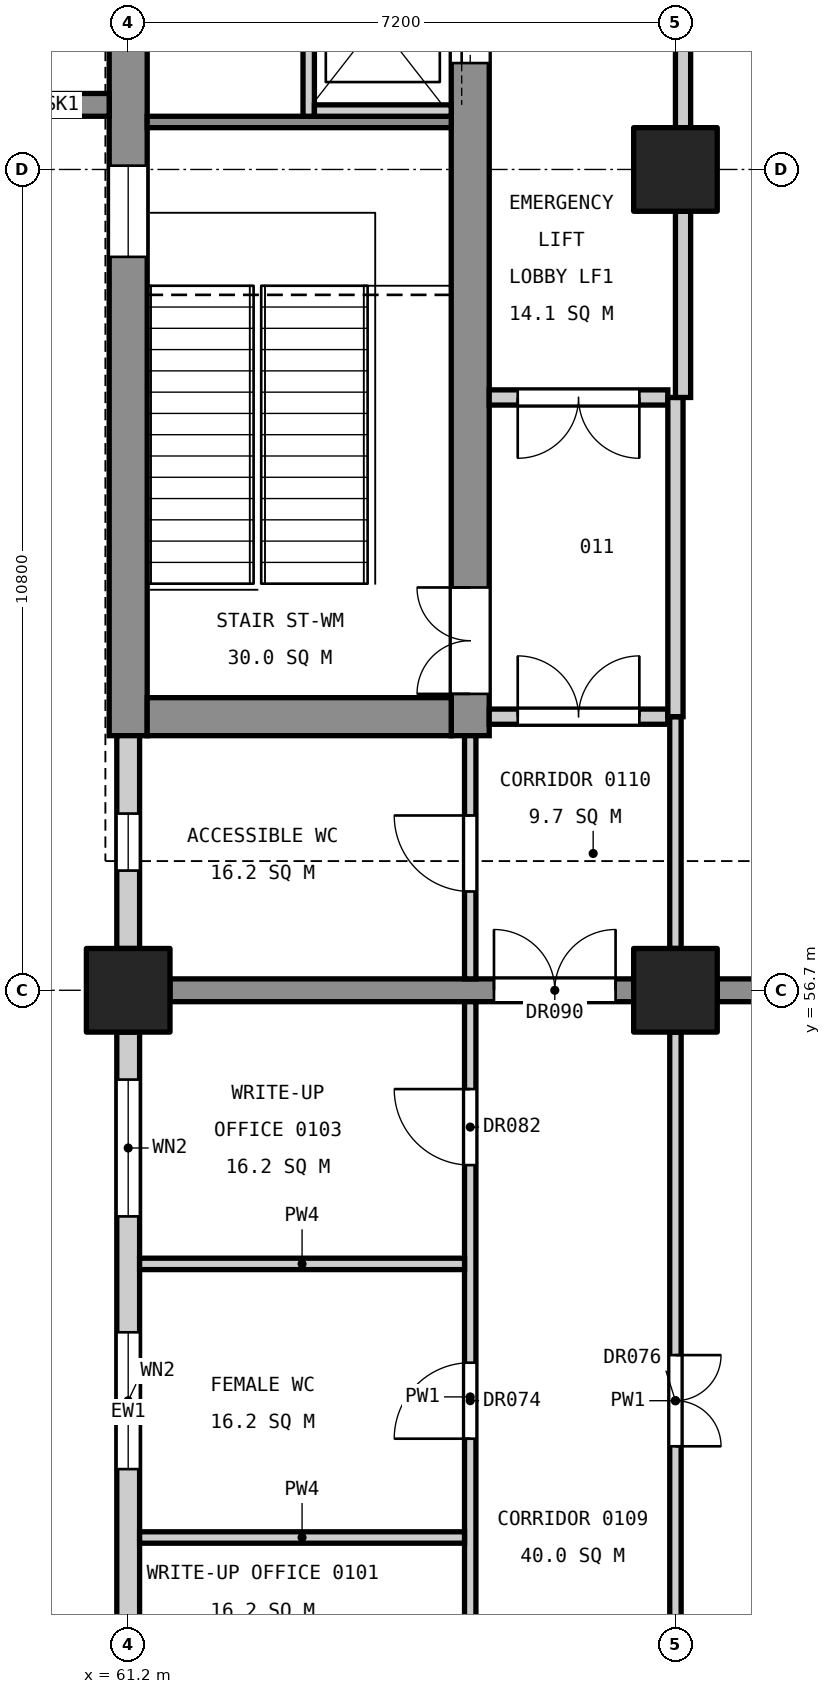
"""IFC4 building model, lengths in metres.
Left out: names, types, materials, properties, quantities, classifications, styles, units other than length and angle.
Written with IfcOpenShell. Run it as: python <this file> out.ifc"""

import sys

from ifc_helpers import new_model, si_unit, direction, frame, frame_2d, origin, origin_2d, place, context, subcontext, project, spatial, rectangle, extrude, element, fill, save


model = new_model("IFC4")
c1 = context("Model", 3, precision=1e-05, world=origin(), true_north=direction((0.0, 1.0)))
c2 = subcontext(c1, "Body", "Model", "MODEL_VIEW")
j1 = project(units=[si_unit("LENGTHUNIT", "METRE"), si_unit("PLANEANGLEUNIT", "RADIAN")], contexts=[c1])
p1 = place(None, origin())
s1 = spatial("IfcSite", under=j1, at=p1, CompositionType="ELEMENT")
p2 = place(p1, origin())
s2 = spatial("IfcBuilding", under=s1, at=p2, CompositionType="ELEMENT")
p3 = place(p2, frame((0.0, 0.0, 6.0)))
s3 = spatial("IfcBuildingStorey", under=s2, at=p3, CompositionType="ELEMENT", Elevation=6.0)
for number, where, z_axis, x_axis in (
    (1, (61.2, 56.7, 0.0), (0.0, 0.0, 1.0), (1.0, 0.0, 0.0)),
    (2, (68.4, 56.7, 0.0), (0.0, 0.0, 1.0), (1.0, 0.0, 0.0)),
    (3, (68.4, 67.5, 0.0), (0.0, 0.0, 1.0), (1.0, 0.0, 0.0)),
):
    element("IfcColumn", number, at=place(p3, frame(where, z_axis=z_axis, x_axis=x_axis)), inside=s3, PredefinedType="COLUMN", context=c2, shape_type="SweptSolid", body=[
        extrude(rectangle(XDim=1.1, YDim=1.1, at=origin_2d()), origin(), (0.0, 0.0, 1.0), 5.4),
    ])
p4 = place(p3, frame((61.2, 60.05, 0.0), z_axis=(0.0, 0.0, 1.0), x_axis=(0.0, 1.0, 0.0)))
e4 = element("IfcWall", 4, at=p4, inside=s3, PredefinedType="SHEAR", context=c2, shape_type="SweptSolid", body=[
    extrude(rectangle(XDim=14.9, YDim=0.5, at=frame_2d((7.45, 0.0))), origin(), (0.0, 0.0, 1.0), 5.1),
])
p5 = place(p4, frame((6.3, 0.0, 3.4)))
e5 = element("IfcOpeningElement", 5, at=p5, cuts=e4, PredefinedType="OPENING", context=c2, shape_type="SweptSolid", body=[
    extrude(rectangle(XDim=1.2, YDim=0.9, at=frame_2d((0.6, 0.45))), frame((0.0, 0.26, 0.0), z_axis=(0.0, -1.0, 0.0), x_axis=(1.0, 0.0, 0.0)), (0.0, 0.0, 1.0), 0.52),
])
p6 = place(p3, frame((65.7, 60.05, 0.0), z_axis=(0.0, 0.0, 1.0), x_axis=(0.0, 1.0, 0.0)))
e6 = element("IfcWall", 6, at=p6, inside=s3, PredefinedType="SHEAR", context=c2, shape_type="SweptSolid", body=[
    extrude(rectangle(XDim=14.9, YDim=0.5, at=frame_2d((7.45, 0.0))), origin(), (0.0, 0.0, 1.0), 5.1),
])
p7 = place(p6, frame((0.55, 0.0, 0.0)))
e7 = element("IfcOpeningElement", 7, at=p7, cuts=e6, PredefinedType="OPENING", context=c2, shape_type="SweptSolid", body=[
    extrude(rectangle(XDim=1.4, YDim=2.1, at=frame_2d((0.7, 1.05))), frame((0.0, 0.26, 0.0), z_axis=(0.0, -1.0, 0.0), x_axis=(1.0, 0.0, 0.0)), (0.0, 0.0, 1.0), 0.52),
])
p8 = place(p6, frame((8.85, 0.0, 0.0)))
e8 = element("IfcOpeningElement", 8, at=p8, cuts=e6, PredefinedType="OPENING", context=c2, shape_type="SweptSolid", body=[
    extrude(rectangle(XDim=1.1, YDim=2.1, at=frame_2d((0.55, 1.05))), frame((0.0, 0.26, 0.0), z_axis=(0.0, -1.0, 0.0), x_axis=(1.0, 0.0, 0.0)), (0.0, 0.0, 1.0), 0.52),
])
p9 = place(p6, frame((11.4, 0.0, 0.0)))
e9 = element("IfcOpeningElement", 9, at=p9, cuts=e6, PredefinedType="OPENING", context=c2, shape_type="SweptSolid", body=[
    extrude(rectangle(XDim=1.1, YDim=2.1, at=frame_2d((0.55, 1.05))), frame((0.0, 0.26, 0.0), z_axis=(0.0, -1.0, 0.0), x_axis=(1.0, 0.0, 0.0)), (0.0, 0.0, 1.0), 0.52),
])
p10 = place(p3, frame((61.45, 60.3, 0.0), z_axis=(0.0, 0.0, 1.0), x_axis=(1.0, 0.0, 0.0)))
e10 = element("IfcWall", 10, at=p10, inside=s3, PredefinedType="SHEAR", context=c2, shape_type="SweptSolid", body=[
    extrude(rectangle(XDim=4.0, YDim=0.5, at=frame_2d((2.0, 0.0))), origin(), (0.0, 0.0, 1.0), 5.1),
])
p11 = place(p3, frame((60.95, 68.35, 0.0), z_axis=(0.0, 0.0, 1.0), x_axis=(-1.0, 0.0, 0.0)))
e11 = element("IfcWall", 11, at=p11, inside=s3, PredefinedType="SHEAR", context=c2, shape_type="SweptSolid", body=[
    extrude(rectangle(XDim=1.25, YDim=0.3, at=frame_2d((0.625, 0.0))), origin(), (0.0, 0.0, 1.0), 5.4),
])
p12 = place(p3, frame((61.75, 56.7, 0.0), z_axis=(0.0, 0.0, 1.0), x_axis=(1.0, 0.0, 0.0)))
e12 = element("IfcWall", 12, at=p12, inside=s3, PredefinedType="SHEAR", context=c2, shape_type="SweptSolid", body=[
    extrude(rectangle(XDim=6.1, YDim=0.3, at=frame_2d((3.05, 0.0))), origin(), (0.0, 0.0, 1.0), 5.1),
])
p13 = place(p12, frame((4.262, 0.0, 0.0)))
e13 = element("IfcOpeningElement", 13, at=p13, cuts=e12, PredefinedType="OPENING", context=c2, shape_type="SweptSolid", body=[
    extrude(rectangle(XDim=1.6, YDim=2.1, at=frame_2d((0.8, 1.05))), frame((0.0, 0.16, 0.0), z_axis=(0.0, -1.0, 0.0), x_axis=(1.0, 0.0, 0.0)), (0.0, 0.0, 1.0), 0.32),
])
p14 = place(p3, frame((68.95, 56.7, 0.0), z_axis=(0.0, 0.0, 1.0), x_axis=(1.0, 0.0, 0.0)))
e14 = element("IfcWall", 14, at=p14, inside=s3, PredefinedType="SHEAR", context=c2, shape_type="SweptSolid", body=[
    extrude(rectangle(XDim=9.7, YDim=0.3, at=frame_2d((4.85, 0.0))), origin(), (0.0, 0.0, 1.0), 5.1),
])
p15 = place(p3, frame((61.45, 68.125, 0.0), z_axis=(0.0, 0.0, 1.0), x_axis=(1.0, 0.0, 0.0)))
e15 = element("IfcWall", 15, at=p15, inside=s3, PredefinedType="SOLIDWALL", context=c2, shape_type="SweptSolid", body=[
    extrude(rectangle(XDim=4.0, YDim=0.15, at=frame_2d((2.0, 0.0))), origin(), (0.0, 0.0, 1.0), 5.1),
])
p16 = place(p3, frame((63.575, 68.2, 0.0), z_axis=(0.0, 0.0, 1.0), x_axis=(0.0, 1.0, 0.0)))
e16 = element("IfcWall", 16, at=p16, inside=s3, PredefinedType="SOLIDWALL", context=c2, shape_type="SweptSolid", body=[
    extrude(rectangle(XDim=2.5, YDim=0.15, at=frame_2d((1.25, 0.0))), origin(), (0.0, 0.0, 1.0), 5.4),
])
p17 = place(p3, frame((63.65, 68.275, 0.0), z_axis=(0.0, 0.0, 1.0), x_axis=(1.0, 0.0, 0.0)))
e17 = element("IfcWall", 17, at=p17, inside=s3, PredefinedType="SOLIDWALL", context=c2, shape_type="SweptSolid", body=[
    extrude(rectangle(XDim=1.8, YDim=0.15, at=frame_2d((0.9, 0.0))), origin(), (0.0, 0.0, 1.0), 5.4),
])
p18 = place(p3, frame((61.2, 46.15, 0.0), z_axis=(0.0, 0.0, 1.0), x_axis=(0.0, 1.0, 0.0)))
e18 = element("IfcWall", 18, at=p18, inside=s3, PredefinedType="STANDARD", context=c2, shape_type="SweptSolid", body=[
    extrude(rectangle(XDim=10.0, YDim=0.3, at=frame_2d((5.0, 0.0))), origin(), (0.0, 0.0, 1.0), 4.1),
])
p19 = place(p18, frame((1.3, 0.0, 0.8)))
e19 = element("IfcOpeningElement", 19, at=p19, cuts=e18, PredefinedType="OPENING", context=c2, shape_type="SweptSolid", body=[
    extrude(rectangle(XDim=0.75, YDim=1.2, at=frame_2d((0.375, 0.6))), frame((0.0, 0.16, 0.0), z_axis=(0.0, -1.0, 0.0), x_axis=(1.0, 0.0, 0.0)), (0.0, 0.0, 1.0), 0.32),
])
p20 = place(p18, frame((4.25, 0.0, 0.9)))
e20 = element("IfcOpeningElement", 20, at=p20, cuts=e18, PredefinedType="OPENING", context=c2, shape_type="SweptSolid", body=[
    extrude(rectangle(XDim=1.8, YDim=3.0, at=frame_2d((0.9, 1.5))), frame((0.0, 0.16, 0.0), z_axis=(0.0, -1.0, 0.0), x_axis=(1.0, 0.0, 0.0)), (0.0, 0.0, 1.0), 0.32),
])
p21 = place(p18, frame((7.575, 0.0, 0.9)))
e21 = element("IfcOpeningElement", 21, at=p21, cuts=e18, PredefinedType="OPENING", context=c2, shape_type="SweptSolid", body=[
    extrude(rectangle(XDim=1.8, YDim=3.0, at=frame_2d((0.9, 1.5))), frame((0.0, 0.16, 0.0), z_axis=(0.0, -1.0, 0.0), x_axis=(1.0, 0.0, 0.0)), (0.0, 0.0, 1.0), 0.32),
])
p22 = place(p3, frame((61.2, 57.25, 0.0), z_axis=(0.0, 0.0, 1.0), x_axis=(0.0, 1.0, 0.0)))
e22 = element("IfcWall", 22, at=p22, inside=s3, PredefinedType="STANDARD", context=c2, shape_type="SweptSolid", body=[
    extrude(rectangle(XDim=2.8, YDim=0.3, at=frame_2d((1.4, 0.0))), origin(), (0.0, 0.0, 1.0), 4.1),
])
p23 = place(p22, frame((1.025, 0.0, 0.8)))
e23 = element("IfcOpeningElement", 23, at=p23, cuts=e22, PredefinedType="OPENING", context=c2, shape_type="SweptSolid", body=[
    extrude(rectangle(XDim=0.75, YDim=1.2, at=frame_2d((0.375, 0.6))), frame((0.0, 0.16, 0.0), z_axis=(0.0, -1.0, 0.0), x_axis=(1.0, 0.0, 0.0)), (0.0, 0.0, 1.0), 0.32),
])
p24 = place(p3, frame((65.7, 46.15, 0.0), z_axis=(0.0, 0.0, 1.0), x_axis=(0.0, 1.0, 0.0)))
e24 = element("IfcWall", 24, at=p24, inside=s3, PredefinedType="PARTITIONING", context=c2, shape_type="SweptSolid", body=[
    extrude(rectangle(XDim=10.4, YDim=0.15, at=frame_2d((5.2, 0.0))), origin(), (0.0, 0.0, 1.0), 4.0),
])
p25 = place(p24, frame((4.65, 0.0, 0.0)))
e25 = element("IfcOpeningElement", 25, at=p25, cuts=e24, PredefinedType="OPENING", context=c2, shape_type="SweptSolid", body=[
    extrude(rectangle(XDim=1.0, YDim=2.1, at=frame_2d((0.5, 1.05))), frame((0.0, 0.085, 0.0), z_axis=(0.0, -1.0, 0.0), x_axis=(1.0, 0.0, 0.0)), (0.0, 0.0, 1.0), 0.17),
])
p26 = place(p24, frame((1.05, 0.0, 0.0)))
e26 = element("IfcOpeningElement", 26, at=p26, cuts=e24, PredefinedType="OPENING", context=c2, shape_type="SweptSolid", body=[
    extrude(rectangle(XDim=1.0, YDim=2.1, at=frame_2d((0.5, 1.05))), frame((0.0, 0.085, 0.0), z_axis=(0.0, -1.0, 0.0), x_axis=(1.0, 0.0, 0.0)), (0.0, 0.0, 1.0), 0.17),
])
p27 = place(p24, frame((8.25, 0.0, 0.0)))
e27 = element("IfcOpeningElement", 27, at=p27, cuts=e24, PredefinedType="OPENING", context=c2, shape_type="SweptSolid", body=[
    extrude(rectangle(XDim=1.0, YDim=2.1, at=frame_2d((0.5, 1.05))), frame((0.0, 0.085, 0.0), z_axis=(0.0, -1.0, 0.0), x_axis=(1.0, 0.0, 0.0)), (0.0, 0.0, 1.0), 0.17),
])
p28 = place(p3, frame((65.7, 56.85, 0.0), z_axis=(0.0, 0.0, 1.0), x_axis=(0.0, 1.0, 0.0)))
e28 = element("IfcWall", 28, at=p28, inside=s3, PredefinedType="PARTITIONING", context=c2, shape_type="SweptSolid", body=[
    extrude(rectangle(XDim=3.2, YDim=0.15, at=frame_2d((1.6, 0.0))), origin(), (0.0, 0.0, 1.0), 4.0),
])
p29 = place(p28, frame((1.15, 0.0, 0.0)))
e29 = element("IfcOpeningElement", 29, at=p29, cuts=e28, PredefinedType="OPENING", context=c2, shape_type="SweptSolid", body=[
    extrude(rectangle(XDim=1.0, YDim=2.1, at=frame_2d((0.5, 1.05))), frame((0.0, 0.085, 0.0), z_axis=(0.0, -1.0, 0.0), x_axis=(1.0, 0.0, 0.0)), (0.0, 0.0, 1.0), 0.17),
])
for number, where, z_axis, x_axis in (
    (30, (61.35, 49.5, 0.0), (0.0, 0.0, 1.0), (1.0, 0.0, 0.0)),
    (31, (61.35, 53.1, 0.0), (0.0, 0.0, 1.0), (1.0, 0.0, 0.0)),
):
    element("IfcWall", number, at=place(p3, frame(where, z_axis=z_axis, x_axis=x_axis)), inside=s3, PredefinedType="PARTITIONING", context=c2, shape_type="SweptSolid", body=[
        extrude(rectangle(XDim=4.275, YDim=0.15, at=frame_2d((2.137, 0.0))), origin(), (0.0, 0.0, 1.0), 4.3),
    ])
p30 = place(p3, frame((65.95, 60.3, 0.0), z_axis=(0.0, 0.0, 1.0), x_axis=(1.0, 0.0, 0.0)))
e32 = element("IfcWall", 32, at=p30, inside=s3, PredefinedType="PARTITIONING", context=c2, shape_type="SweptSolid", body=[
    extrude(rectangle(XDim=2.35, YDim=0.2, at=frame_2d((1.175, 0.0))), origin(), (0.0, 0.0, 1.0), 4.3),
])
p31 = place(p30, frame((0.375, 0.0, 0.0)))
e33 = element("IfcOpeningElement", 33, at=p31, cuts=e32, PredefinedType="OPENING", context=c2, shape_type="SweptSolid", body=[
    extrude(rectangle(XDim=1.6, YDim=2.1, at=frame_2d((0.8, 1.05))), frame((0.0, 0.11, 0.0), z_axis=(0.0, -1.0, 0.0), x_axis=(1.0, 0.0, 0.0)), (0.0, 0.0, 1.0), 0.22),
])
p32 = place(p3, frame((65.95, 64.5, 0.0), z_axis=(0.0, 0.0, 1.0), x_axis=(1.0, 0.0, 0.0)))
e34 = element("IfcWall", 34, at=p32, inside=s3, PredefinedType="PARTITIONING", context=c2, shape_type="SweptSolid", body=[
    extrude(rectangle(XDim=2.35, YDim=0.2, at=frame_2d((1.175, 0.0))), origin(), (0.0, 0.0, 1.0), 4.0),
])
p33 = place(p32, frame((0.375, 0.0, 0.0)))
e35 = element("IfcOpeningElement", 35, at=p33, cuts=e34, PredefinedType="OPENING", context=c2, shape_type="SweptSolid", body=[
    extrude(rectangle(XDim=1.6, YDim=2.1, at=frame_2d((0.8, 1.05))), frame((0.0, 0.11, 0.0), z_axis=(0.0, -1.0, 0.0), x_axis=(1.0, 0.0, 0.0)), (0.0, 0.0, 1.0), 0.22),
])
p34 = place(p3, frame((68.4, 46.45, 0.0), z_axis=(0.0, 0.0, 1.0), x_axis=(0.0, 1.0, 0.0)))
e36 = element("IfcWall", 36, at=p34, inside=s3, PredefinedType="PARTITIONING", context=c2, shape_type="SweptSolid", body=[
    extrude(rectangle(XDim=9.7, YDim=0.15, at=frame_2d((4.85, 0.0))), origin(), (0.0, 0.0, 1.0), 4.0),
])
p35 = place(p34, frame((4.25, 0.0, 0.0)))
e37 = element("IfcOpeningElement", 37, at=p35, cuts=e36, PredefinedType="OPENING", context=c2, shape_type="SweptSolid", body=[
    extrude(rectangle(XDim=1.2, YDim=2.1, at=frame_2d((0.6, 1.05))), frame((0.0, 0.085, 0.0), z_axis=(0.0, -1.0, 0.0), x_axis=(1.0, 0.0, 0.0)), (0.0, 0.0, 1.0), 0.17),
])
p36 = place(p3, frame((68.4, 57.25, 0.0), z_axis=(0.0, 0.0, 1.0), x_axis=(0.0, 1.0, 0.0)))
e38 = element("IfcWall", 38, at=p36, inside=s3, PredefinedType="PARTITIONING", context=c2, shape_type="SweptSolid", body=[
    extrude(rectangle(XDim=3.05, YDim=0.15, at=frame_2d((1.525, 0.0))), origin(), (0.0, 0.0, 1.0), 4.0),
])
p37 = place(p3, frame((68.4, 60.3, 0.0), z_axis=(0.0, 0.0, 1.0), x_axis=(0.0, 1.0, 0.0)))
e39 = element("IfcWall", 39, at=p37, inside=s3, PredefinedType="PARTITIONING", context=c2, shape_type="SweptSolid", body=[
    extrude(rectangle(XDim=4.2, YDim=0.2, at=frame_2d((2.1, 0.0))), origin(), (0.0, 0.0, 1.0), 4.0),
])
p38 = place(p3, frame((68.5, 64.5, 0.0), z_axis=(0.0, 0.0, 1.0), x_axis=(0.0, 1.0, 0.0)))
e40 = element("IfcWall", 40, at=p38, inside=s3, PredefinedType="PARTITIONING", context=c2, shape_type="SweptSolid", body=[
    extrude(rectangle(XDim=2.45, YDim=0.2, at=frame_2d((1.225, 0.0))), origin(), (0.0, 0.0, 1.0), 4.0),
])
p39 = place(p3, frame((68.5, 68.05, 0.0), z_axis=(0.0, 0.0, 1.0), x_axis=(0.0, 1.0, 0.0)))
e41 = element("IfcWall", 41, at=p39, inside=s3, PredefinedType="PARTITIONING", context=c2, shape_type="SweptSolid", body=[
    extrude(rectangle(XDim=2.75, YDim=0.2, at=frame_2d((1.375, 0.0))), origin(), (0.0, 0.0, 1.0), 4.0),
])
p40 = place(p7, origin())
e42 = element("IfcDoor", 42, at=p40, inside=s3, OperationType="DOUBLE_DOOR_SINGLE_SWING", PredefinedType="DOOR", context=c2, shape_type="SweptSolid", body=[
    extrude(rectangle(XDim=1.4, YDim=2.1, at=frame_2d((0.7, 1.05))), frame((0.0, 0.025, 0.0), z_axis=(0.0, -1.0, 0.0), x_axis=(1.0, 0.0, 0.0)), (0.0, 0.0, 1.0), 0.05),
])
fill(e7, e42)
p41 = place(p8, origin())
e43 = element("IfcDoor", 43, at=p41, inside=s3, OperationType="SLIDING_TO_LEFT", PredefinedType="DOOR", context=c2, shape_type="SweptSolid", body=[
    extrude(rectangle(XDim=1.1, YDim=2.1, at=frame_2d((0.55, 1.05))), frame((0.0, 0.025, 0.0), z_axis=(0.0, -1.0, 0.0), x_axis=(1.0, 0.0, 0.0)), (0.0, 0.0, 1.0), 0.05),
])
fill(e8, e43)
p42 = place(p20, origin())
e44 = element("IfcWindow", 44, at=p42, inside=s3, PartitioningType="SINGLE_PANEL", PredefinedType="WINDOW", context=c2, shape_type="SweptSolid", body=[
    extrude(rectangle(XDim=1.8, YDim=3.0, at=frame_2d((0.9, 1.5))), frame((0.0, 0.03, 0.0), z_axis=(0.0, -1.0, 0.0), x_axis=(1.0, 0.0, 0.0)), (0.0, 0.0, 1.0), 0.06),
])
fill(e20, e44)
p43 = place(p21, origin())
e45 = element("IfcWindow", 45, at=p43, inside=s3, PartitioningType="SINGLE_PANEL", PredefinedType="WINDOW", context=c2, shape_type="SweptSolid", body=[
    extrude(rectangle(XDim=1.8, YDim=3.0, at=frame_2d((0.9, 1.5))), frame((0.0, 0.03, 0.0), z_axis=(0.0, -1.0, 0.0), x_axis=(1.0, 0.0, 0.0)), (0.0, 0.0, 1.0), 0.06),
])
fill(e21, e45)
p44 = place(p23, origin())
e46 = element("IfcWindow", 46, at=p44, inside=s3, PartitioningType="SINGLE_PANEL", PredefinedType="WINDOW", context=c2, shape_type="SweptSolid", body=[
    extrude(rectangle(XDim=0.75, YDim=1.2, at=frame_2d((0.375, 0.6))), frame((0.0, 0.03, 0.0), z_axis=(0.0, -1.0, 0.0), x_axis=(1.0, 0.0, 0.0)), (0.0, 0.0, 1.0), 0.06),
])
fill(e23, e46)
p45 = place(p5, origin())
e47 = element("IfcWindow", 47, at=p45, inside=s3, PartitioningType="SINGLE_PANEL", PredefinedType="WINDOW", context=c2, shape_type="SweptSolid", body=[
    extrude(rectangle(XDim=1.2, YDim=0.9, at=frame_2d((0.6, 0.45))), frame((0.0, 0.03, 0.0), z_axis=(0.0, -1.0, 0.0), x_axis=(1.0, 0.0, 0.0)), (0.0, 0.0, 1.0), 0.06),
])
fill(e5, e47)
p46 = place(p29, origin())
e48 = element("IfcDoor", 48, at=p46, inside=s3, OperationType="SINGLE_SWING_RIGHT", PredefinedType="DOOR", context=c2, shape_type="SweptSolid", body=[
    extrude(rectangle(XDim=1.0, YDim=2.1, at=frame_2d((0.5, 1.05))), frame((0.0, 0.025, 0.0), z_axis=(0.0, -1.0, 0.0), x_axis=(1.0, 0.0, 0.0)), (0.0, 0.0, 1.0), 0.05),
])
fill(e29, e48)
p47 = place(p25, origin())
e49 = element("IfcDoor", 49, at=p47, inside=s3, OperationType="SINGLE_SWING_LEFT", PredefinedType="DOOR", context=c2, shape_type="SweptSolid", body=[
    extrude(rectangle(XDim=1.0, YDim=2.1, at=frame_2d((0.5, 1.05))), frame((0.0, 0.025, 0.0), z_axis=(0.0, -1.0, 0.0), x_axis=(1.0, 0.0, 0.0)), (0.0, 0.0, 1.0), 0.05),
])
fill(e25, e49)
p48 = place(p35, frame((1.2, 0.0, 0.0), z_axis=(0.0, 0.0, 1.0), x_axis=(-1.0, 0.0, 0.0)))
e50 = element("IfcDoor", 50, at=p48, inside=s3, OperationType="DOUBLE_DOOR_SINGLE_SWING", PredefinedType="DOOR", context=c2, shape_type="SweptSolid", body=[
    extrude(rectangle(XDim=1.2, YDim=2.1, at=frame_2d((0.6, 1.05))), frame((0.0, 0.025, 0.0), z_axis=(0.0, -1.0, 0.0), x_axis=(1.0, 0.0, 0.0)), (0.0, 0.0, 1.0), 0.05),
])
fill(e37, e50)
p49 = place(p27, origin())
e51 = element("IfcDoor", 51, at=p49, inside=s3, OperationType="SINGLE_SWING_RIGHT", PredefinedType="DOOR", context=c2, shape_type="SweptSolid", body=[
    extrude(rectangle(XDim=1.0, YDim=2.1, at=frame_2d((0.5, 1.05))), frame((0.0, 0.025, 0.0), z_axis=(0.0, -1.0, 0.0), x_axis=(1.0, 0.0, 0.0)), (0.0, 0.0, 1.0), 0.05),
])
fill(e27, e51)
p50 = place(p31, origin())
e52 = element("IfcDoor", 52, at=p50, inside=s3, OperationType="DOUBLE_DOOR_SINGLE_SWING", PredefinedType="DOOR", context=c2, shape_type="SweptSolid", body=[
    extrude(rectangle(XDim=1.6, YDim=2.1, at=frame_2d((0.8, 1.05))), frame((0.0, 0.025, 0.0), z_axis=(0.0, -1.0, 0.0), x_axis=(1.0, 0.0, 0.0)), (0.0, 0.0, 1.0), 0.05),
])
fill(e33, e52)
p51 = place(p33, frame((1.6, 0.0, 0.0), z_axis=(0.0, 0.0, 1.0), x_axis=(-1.0, 0.0, 0.0)))
e53 = element("IfcDoor", 53, at=p51, inside=s3, OperationType="DOUBLE_DOOR_SINGLE_SWING", PredefinedType="DOOR", context=c2, shape_type="SweptSolid", body=[
    extrude(rectangle(XDim=1.6, YDim=2.1, at=frame_2d((0.8, 1.05))), frame((0.0, 0.025, 0.0), z_axis=(0.0, -1.0, 0.0), x_axis=(1.0, 0.0, 0.0)), (0.0, 0.0, 1.0), 0.05),
])
fill(e35, e53)
p52 = place(p13, origin())
e54 = element("IfcDoor", 54, at=p52, inside=s3, OperationType="DOUBLE_DOOR_SINGLE_SWING", PredefinedType="DOOR", context=c2, shape_type="SweptSolid", body=[
    extrude(rectangle(XDim=1.6, YDim=2.1, at=frame_2d((0.8, 1.05))), frame((0.0, 0.025, 0.0), z_axis=(0.0, -1.0, 0.0), x_axis=(1.0, 0.0, 0.0)), (0.0, 0.0, 1.0), 0.05),
])
fill(e13, e54)
save(model, sys.argv[1])
